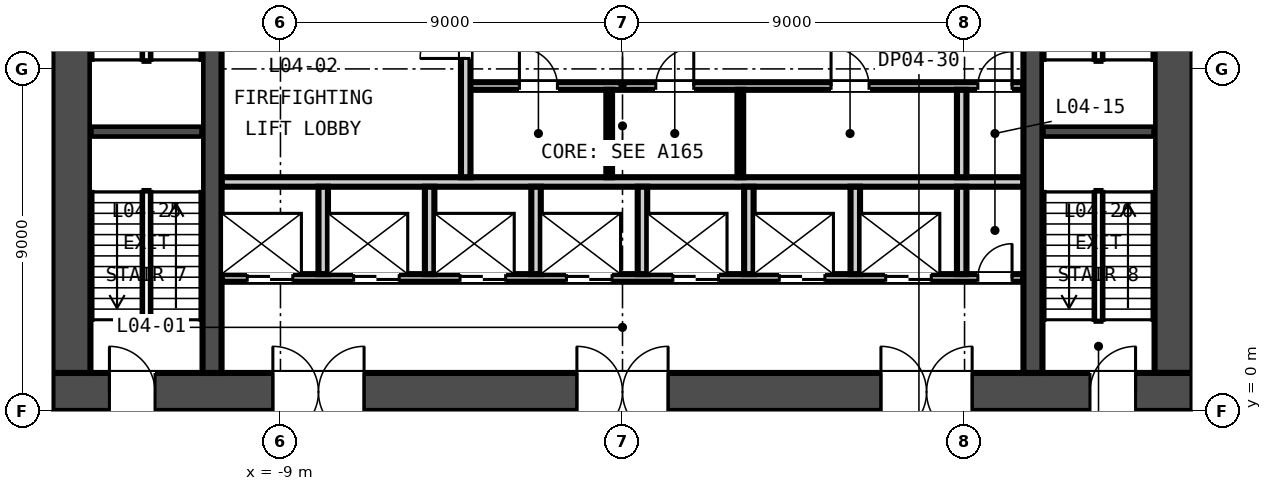
"""IFC4 building model, lengths in metres.
Left out: names, types, materials, properties, quantities, classifications, styles, units other than length and angle.
Written with IfcOpenShell. Run it as: python <this file> out.ifc"""

import sys

from ifc_helpers import new_model, si_unit, direction, frame, frame_2d, origin, place, context, subcontext, project, spatial, rectangle, extrude, element, fill, save


model = new_model("IFC4")
c1 = context("Model", 3, precision=1e-05, world=origin(), true_north=direction((0.0, 1.0)))
c2 = subcontext(c1, "Body", "Model", "MODEL_VIEW")
j1 = project(units=[si_unit("LENGTHUNIT", "METRE"), si_unit("PLANEANGLEUNIT", "RADIAN")], contexts=[c1])
p1 = place(None, origin())
s1 = spatial("IfcSite", under=j1, at=p1, CompositionType="ELEMENT")
p2 = place(p1, origin())
s2 = spatial("IfcBuilding", under=s1, at=p2, CompositionType="ELEMENT")
p3 = place(p2, frame((0.0, 0.0, 27.0)))
s3 = spatial("IfcBuildingStorey", under=s2, at=p3, CompositionType="ELEMENT", Elevation=27.0)
p4 = place(p3, frame((-15.0, 0.5, -0.3), z_axis=(0.0, 0.0, 1.0), x_axis=(1.0, 0.0, 0.0)))
e1 = element("IfcWall", 1, at=p4, inside=s3, PredefinedType="SOLIDWALL", context=c2, shape_type="SweptSolid", body=[
    extrude(rectangle(XDim=30.0, YDim=1.0, at=frame_2d((15.0, 0.0))), origin(), (0.0, 0.0, 1.0), 4.5),
])
p5 = place(p4, frame((5.8, 0.0, 0.3)))
e2 = element("IfcOpeningElement", 2, at=p5, cuts=e1, PredefinedType="OPENING", context=c2, shape_type="SweptSolid", body=[
    extrude(rectangle(XDim=2.4, YDim=2.4, at=frame_2d((1.2, 1.2))), frame((0.0, 0.51, 0.0), z_axis=(0.0, -1.0, 0.0), x_axis=(1.0, 0.0, 0.0)), (0.0, 0.0, 1.0), 1.02),
])
p6 = place(p4, frame((13.8, 0.0, 0.3)))
e3 = element("IfcOpeningElement", 3, at=p6, cuts=e1, PredefinedType="OPENING", context=c2, shape_type="SweptSolid", body=[
    extrude(rectangle(XDim=2.4, YDim=2.4, at=frame_2d((1.2, 1.2))), frame((0.0, 0.51, 0.0), z_axis=(0.0, -1.0, 0.0), x_axis=(1.0, 0.0, 0.0)), (0.0, 0.0, 1.0), 1.02),
])
p7 = place(p4, frame((21.8, 0.0, 0.3)))
e4 = element("IfcOpeningElement", 4, at=p7, cuts=e1, PredefinedType="OPENING", context=c2, shape_type="SweptSolid", body=[
    extrude(rectangle(XDim=2.4, YDim=2.4, at=frame_2d((1.2, 1.2))), frame((0.0, 0.51, 0.0), z_axis=(0.0, -1.0, 0.0), x_axis=(1.0, 0.0, 0.0)), (0.0, 0.0, 1.0), 1.02),
])
p8 = place(p4, frame((1.5, 0.0, 0.3)))
e5 = element("IfcOpeningElement", 5, at=p8, cuts=e1, PredefinedType="OPENING", context=c2, shape_type="SweptSolid", body=[
    extrude(rectangle(XDim=1.2, YDim=2.1, at=frame_2d((0.6, 1.05))), frame((0.0, 0.51, 0.0), z_axis=(0.0, -1.0, 0.0), x_axis=(1.0, 0.0, 0.0)), (0.0, 0.0, 1.0), 1.02),
])
p9 = place(p4, frame((27.3, 0.0, 0.3)))
e6 = element("IfcOpeningElement", 6, at=p9, cuts=e1, PredefinedType="OPENING", context=c2, shape_type="SweptSolid", body=[
    extrude(rectangle(XDim=1.2, YDim=2.1, at=frame_2d((0.6, 1.05))), frame((0.0, 0.51, 0.0), z_axis=(0.0, -1.0, 0.0), x_axis=(1.0, 0.0, 0.0)), (0.0, 0.0, 1.0), 1.02),
])
for number, where, z_axis, x_axis in (
    (7, (-14.5, 1.0, -0.3), (0.0, 0.0, 1.0), (0.0, 1.0, 0.0)),
    (8, (14.5, 1.0, -0.3), (0.0, 0.0, 1.0), (0.0, 1.0, 0.0)),
):
    element("IfcWall", number, at=place(p3, frame(where, z_axis=z_axis, x_axis=x_axis)), inside=s3, PredefinedType="SOLIDWALL", context=c2, shape_type="SweptSolid", body=[
        extrude(rectangle(XDim=13.0, YDim=1.0, at=frame_2d((6.5, 0.0))), origin(), (0.0, 0.0, 1.0), 4.5),
    ])
for number, where, z_axis, x_axis in (
    (9, (-10.8, 1.0, -0.3), (0.0, 0.0, 1.0), (0.0, 1.0, 0.0)),
    (10, (10.8, 1.0, -0.3), (0.0, 0.0, 1.0), (0.0, 1.0, 0.0)),
):
    element("IfcWall", number, at=place(p3, frame(where, z_axis=z_axis, x_axis=x_axis)), inside=s3, PredefinedType="SOLIDWALL", context=c2, shape_type="SweptSolid", body=[
        extrude(rectangle(XDim=13.0, YDim=0.5, at=frame_2d((6.5, 0.0))), origin(), (0.0, 0.0, 1.0), 4.5),
    ])
p10 = place(p3, frame((-10.55, 3.5, 0.0), z_axis=(0.0, 0.0, 1.0), x_axis=(1.0, 0.0, 0.0)))
e11 = element("IfcWall", 11, at=p10, inside=s3, PredefinedType="PARTITIONING", context=c2, shape_type="SweptSolid", body=[
    extrude(rectangle(XDim=21.1, YDim=0.2, at=frame_2d((10.55, 0.0))), origin(), (0.0, 0.0, 1.0), 4.2),
])
p11 = place(p10, frame((0.675, 0.0, 0.0)))
e12 = element("IfcOpeningElement", 12, at=p11, cuts=e11, PredefinedType="OPENING", context=c2, shape_type="SweptSolid", body=[
    extrude(rectangle(XDim=1.2, YDim=2.1, at=frame_2d((0.6, 1.05))), frame((0.0, 0.11, 0.0), z_axis=(0.0, -1.0, 0.0), x_axis=(1.0, 0.0, 0.0)), (0.0, 0.0, 1.0), 0.22),
])
p12 = place(p10, frame((3.475, 0.0, 0.0)))
e13 = element("IfcOpeningElement", 13, at=p12, cuts=e11, PredefinedType="OPENING", context=c2, shape_type="SweptSolid", body=[
    extrude(rectangle(XDim=1.2, YDim=2.1, at=frame_2d((0.6, 1.05))), frame((0.0, 0.11, 0.0), z_axis=(0.0, -1.0, 0.0), x_axis=(1.0, 0.0, 0.0)), (0.0, 0.0, 1.0), 0.22),
])
p13 = place(p10, frame((6.275, 0.0, 0.0)))
e14 = element("IfcOpeningElement", 14, at=p13, cuts=e11, PredefinedType="OPENING", context=c2, shape_type="SweptSolid", body=[
    extrude(rectangle(XDim=1.2, YDim=2.1, at=frame_2d((0.6, 1.05))), frame((0.0, 0.11, 0.0), z_axis=(0.0, -1.0, 0.0), x_axis=(1.0, 0.0, 0.0)), (0.0, 0.0, 1.0), 0.22),
])
p14 = place(p10, frame((9.075, 0.0, 0.0)))
e15 = element("IfcOpeningElement", 15, at=p14, cuts=e11, PredefinedType="OPENING", context=c2, shape_type="SweptSolid", body=[
    extrude(rectangle(XDim=1.2, YDim=2.1, at=frame_2d((0.6, 1.05))), frame((0.0, 0.11, 0.0), z_axis=(0.0, -1.0, 0.0), x_axis=(1.0, 0.0, 0.0)), (0.0, 0.0, 1.0), 0.22),
])
p15 = place(p10, frame((11.875, 0.0, 0.0)))
e16 = element("IfcOpeningElement", 16, at=p15, cuts=e11, PredefinedType="OPENING", context=c2, shape_type="SweptSolid", body=[
    extrude(rectangle(XDim=1.2, YDim=2.1, at=frame_2d((0.6, 1.05))), frame((0.0, 0.11, 0.0), z_axis=(0.0, -1.0, 0.0), x_axis=(1.0, 0.0, 0.0)), (0.0, 0.0, 1.0), 0.22),
])
p16 = place(p10, frame((14.675, 0.0, 0.0)))
e17 = element("IfcOpeningElement", 17, at=p16, cuts=e11, PredefinedType="OPENING", context=c2, shape_type="SweptSolid", body=[
    extrude(rectangle(XDim=1.2, YDim=2.1, at=frame_2d((0.6, 1.05))), frame((0.0, 0.11, 0.0), z_axis=(0.0, -1.0, 0.0), x_axis=(1.0, 0.0, 0.0)), (0.0, 0.0, 1.0), 0.22),
])
p17 = place(p10, frame((17.475, 0.0, 0.0)))
e18 = element("IfcOpeningElement", 18, at=p17, cuts=e11, PredefinedType="OPENING", context=c2, shape_type="SweptSolid", body=[
    extrude(rectangle(XDim=1.2, YDim=2.1, at=frame_2d((0.6, 1.05))), frame((0.0, 0.11, 0.0), z_axis=(0.0, -1.0, 0.0), x_axis=(1.0, 0.0, 0.0)), (0.0, 0.0, 1.0), 0.22),
])
p18 = place(p10, frame((19.9, 0.0, 0.0)))
e19 = element("IfcOpeningElement", 19, at=p18, cuts=e11, PredefinedType="OPENING", context=c2, shape_type="SweptSolid", body=[
    extrude(rectangle(XDim=0.9, YDim=2.1, at=frame_2d((0.45, 1.05))), frame((0.0, 0.11, 0.0), z_axis=(0.0, -1.0, 0.0), x_axis=(1.0, 0.0, 0.0)), (0.0, 0.0, 1.0), 0.22),
])
p19 = place(p3, frame((-10.55, 6.025, 0.0), z_axis=(0.0, 0.0, 1.0), x_axis=(1.0, 0.0, 0.0)))
e20 = element("IfcWall", 20, at=p19, inside=s3, PredefinedType="PARTITIONING", context=c2, shape_type="SweptSolid", body=[
    extrude(rectangle(XDim=21.1, YDim=0.25, at=frame_2d((10.55, 0.0))), origin(), (0.0, 0.0, 1.0), 4.2),
])
p20 = place(p3, frame((-4.125, 8.55, 0.0), z_axis=(0.0, 0.0, 1.0), x_axis=(1.0, 0.0, 0.0)))
e21 = element("IfcWall", 21, at=p20, inside=s3, PredefinedType="PARTITIONING", context=c2, shape_type="SweptSolid", body=[
    extrude(rectangle(XDim=14.675, YDim=0.2, at=frame_2d((7.337, 0.0))), origin(), (0.0, 0.0, 1.0), 4.2),
])
p21 = place(p20, frame((1.413, 0.0, 0.0)))
e22 = element("IfcOpeningElement", 22, at=p21, cuts=e21, PredefinedType="OPENING", context=c2, shape_type="SweptSolid", body=[
    extrude(rectangle(XDim=1.0, YDim=2.1, at=frame_2d((0.5, 1.05))), frame((0.0, 0.11, 0.0), z_axis=(0.0, -1.0, 0.0), x_axis=(1.0, 0.0, 0.0)), (0.0, 0.0, 1.0), 0.22),
])
p22 = place(p20, frame((5.0, 0.0, 0.0)))
e23 = element("IfcOpeningElement", 23, at=p22, cuts=e21, PredefinedType="OPENING", context=c2, shape_type="SweptSolid", body=[
    extrude(rectangle(XDim=1.0, YDim=2.1, at=frame_2d((0.5, 1.05))), frame((0.0, 0.11, 0.0), z_axis=(0.0, -1.0, 0.0), x_axis=(1.0, 0.0, 0.0)), (0.0, 0.0, 1.0), 0.22),
])
p23 = place(p20, frame((9.613, 0.0, 0.0)))
e24 = element("IfcOpeningElement", 24, at=p23, cuts=e21, PredefinedType="OPENING", context=c2, shape_type="SweptSolid", body=[
    extrude(rectangle(XDim=1.0, YDim=2.1, at=frame_2d((0.5, 1.05))), frame((0.0, 0.11, 0.0), z_axis=(0.0, -1.0, 0.0), x_axis=(1.0, 0.0, 0.0)), (0.0, 0.0, 1.0), 0.22),
])
p24 = place(p20, frame((13.475, 0.0, 0.0)))
e25 = element("IfcOpeningElement", 25, at=p24, cuts=e21, PredefinedType="OPENING", context=c2, shape_type="SweptSolid", body=[
    extrude(rectangle(XDim=0.9, YDim=2.1, at=frame_2d((0.45, 1.05))), frame((0.0, 0.11, 0.0), z_axis=(0.0, -1.0, 0.0), x_axis=(1.0, 0.0, 0.0)), (0.0, 0.0, 1.0), 0.22),
])
p25 = place(p3, frame((-4.125, 6.15, 0.0), z_axis=(0.0, 0.0, 1.0), x_axis=(0.0, 1.0, 0.0)))
e26 = element("IfcWall", 26, at=p25, inside=s3, PredefinedType="PARTITIONING", context=c2, shape_type="SweptSolid", body=[
    extrude(rectangle(XDim=4.95, YDim=0.25, at=frame_2d((2.475, 0.0))), origin(), (0.0, 0.0, 1.0), 4.2),
])
p26 = place(p25, frame((3.125, 0.0, 0.0)))
e27 = element("IfcOpeningElement", 27, at=p26, cuts=e26, PredefinedType="OPENING", context=c2, shape_type="SweptSolid", body=[
    extrude(rectangle(XDim=1.2, YDim=2.1, at=frame_2d((0.6, 1.05))), frame((0.0, 0.135, 0.0), z_axis=(0.0, -1.0, 0.0), x_axis=(1.0, 0.0, 0.0)), (0.0, 0.0, 1.0), 0.27),
])
for number, where, z_axis, x_axis in (
    (28, (-7.875, 3.6, 0.0), (0.0, 0.0, 1.0), (0.0, 1.0, 0.0)),
    (29, (-5.075, 3.6, 0.0), (0.0, 0.0, 1.0), (0.0, 1.0, 0.0)),
    (30, (-2.275, 3.6, 0.0), (0.0, 0.0, 1.0), (0.0, 1.0, 0.0)),
    (31, (0.525, 3.6, 0.0), (0.0, 0.0, 1.0), (0.0, 1.0, 0.0)),
    (32, (3.325, 3.6, 0.0), (0.0, 0.0, 1.0), (0.0, 1.0, 0.0)),
    (33, (6.125, 3.6, 0.0), (0.0, 0.0, 1.0), (0.0, 1.0, 0.0)),
    (34, (8.925, 3.6, 0.0), (0.0, 0.0, 1.0), (0.0, 1.0, 0.0)),
):
    element("IfcWall", number, at=place(p3, frame(where, z_axis=z_axis, x_axis=x_axis)), inside=s3, PredefinedType="PARTITIONING", context=c2, shape_type="SweptSolid", body=[
        extrude(rectangle(XDim=2.3, YDim=0.25, at=frame_2d((1.15, 0.0))), origin(), (0.0, 0.0, 1.0), 4.2),
    ])
for number, where, z_axis, x_axis in (
    (35, (-0.35, 6.15, 0.0), (0.0, 0.0, 1.0), (0.0, 1.0, 0.0)),
    (36, (3.1, 6.15, 0.0), (0.0, 0.0, 1.0), (0.0, 1.0, 0.0)),
):
    element("IfcWall", number, at=place(p3, frame(where, z_axis=z_axis, x_axis=x_axis)), inside=s3, PredefinedType="PARTITIONING", context=c2, shape_type="SweptSolid", body=[
        extrude(rectangle(XDim=2.3, YDim=0.15, at=frame_2d((1.15, 0.0))), origin(), (0.0, 0.0, 1.0), 4.2),
    ])
p27 = place(p3, frame((8.925, 6.15, 0.0), z_axis=(0.0, 0.0, 1.0), x_axis=(0.0, 1.0, 0.0)))
e37 = element("IfcWall", 37, at=p27, inside=s3, PredefinedType="PARTITIONING", context=c2, shape_type="SweptSolid", body=[
    extrude(rectangle(XDim=2.3, YDim=0.25, at=frame_2d((1.15, 0.0))), origin(), (0.0, 0.0, 1.0), 4.2),
])
for number, where, z_axis, x_axis in (
    (38, (-14.0, 7.35, -0.3), (0.0, 0.0, 1.0), (1.0, 0.0, 0.0)),
    (39, (11.05, 7.35, -0.3), (0.0, 0.0, 1.0), (1.0, 0.0, 0.0)),
):
    element("IfcWall", number, at=place(p3, frame(where, z_axis=z_axis, x_axis=x_axis)), inside=s3, PredefinedType="SOLIDWALL", context=c2, shape_type="SweptSolid", body=[
        extrude(rectangle(XDim=2.95, YDim=0.3, at=frame_2d((1.475, 0.0))), origin(), (0.0, 0.0, 1.0), 4.5),
    ])
p28 = place(p26, origin())
e40 = element("IfcDoor", 40, at=p28, inside=s3, OperationType="SINGLE_SWING_LEFT", PredefinedType="DOOR", context=c2, shape_type="SweptSolid", body=[
    extrude(rectangle(XDim=1.2, YDim=2.1, at=frame_2d((0.6, 1.05))), frame((0.0, 0.025, 0.0), z_axis=(0.0, -1.0, 0.0), x_axis=(1.0, 0.0, 0.0)), (0.0, 0.0, 1.0), 0.05),
])
fill(e27, e40)
p29 = place(p11, origin())
e41 = element("IfcDoor", 41, at=p29, inside=s3, OperationType="DOUBLE_DOOR_SLIDING", PredefinedType="DOOR", context=c2, shape_type="SweptSolid", body=[
    extrude(rectangle(XDim=1.2, YDim=2.1, at=frame_2d((0.6, 1.05))), frame((0.0, 0.025, 0.0), z_axis=(0.0, -1.0, 0.0), x_axis=(1.0, 0.0, 0.0)), (0.0, 0.0, 1.0), 0.05),
])
fill(e12, e41)
p30 = place(p12, origin())
e42 = element("IfcDoor", 42, at=p30, inside=s3, OperationType="DOUBLE_DOOR_SLIDING", PredefinedType="DOOR", context=c2, shape_type="SweptSolid", body=[
    extrude(rectangle(XDim=1.2, YDim=2.1, at=frame_2d((0.6, 1.05))), frame((0.0, 0.025, 0.0), z_axis=(0.0, -1.0, 0.0), x_axis=(1.0, 0.0, 0.0)), (0.0, 0.0, 1.0), 0.05),
])
fill(e13, e42)
p31 = place(p13, origin())
e43 = element("IfcDoor", 43, at=p31, inside=s3, OperationType="DOUBLE_DOOR_SLIDING", PredefinedType="DOOR", context=c2, shape_type="SweptSolid", body=[
    extrude(rectangle(XDim=1.2, YDim=2.1, at=frame_2d((0.6, 1.05))), frame((0.0, 0.025, 0.0), z_axis=(0.0, -1.0, 0.0), x_axis=(1.0, 0.0, 0.0)), (0.0, 0.0, 1.0), 0.05),
])
fill(e14, e43)
p32 = place(p14, origin())
e44 = element("IfcDoor", 44, at=p32, inside=s3, OperationType="DOUBLE_DOOR_SLIDING", PredefinedType="DOOR", context=c2, shape_type="SweptSolid", body=[
    extrude(rectangle(XDim=1.2, YDim=2.1, at=frame_2d((0.6, 1.05))), frame((0.0, 0.025, 0.0), z_axis=(0.0, -1.0, 0.0), x_axis=(1.0, 0.0, 0.0)), (0.0, 0.0, 1.0), 0.05),
])
fill(e15, e44)
p33 = place(p15, origin())
e45 = element("IfcDoor", 45, at=p33, inside=s3, OperationType="DOUBLE_DOOR_SLIDING", PredefinedType="DOOR", context=c2, shape_type="SweptSolid", body=[
    extrude(rectangle(XDim=1.2, YDim=2.1, at=frame_2d((0.6, 1.05))), frame((0.0, 0.025, 0.0), z_axis=(0.0, -1.0, 0.0), x_axis=(1.0, 0.0, 0.0)), (0.0, 0.0, 1.0), 0.05),
])
fill(e16, e45)
p34 = place(p16, origin())
e46 = element("IfcDoor", 46, at=p34, inside=s3, OperationType="DOUBLE_DOOR_SLIDING", PredefinedType="DOOR", context=c2, shape_type="SweptSolid", body=[
    extrude(rectangle(XDim=1.2, YDim=2.1, at=frame_2d((0.6, 1.05))), frame((0.0, 0.025, 0.0), z_axis=(0.0, -1.0, 0.0), x_axis=(1.0, 0.0, 0.0)), (0.0, 0.0, 1.0), 0.05),
])
fill(e17, e46)
p35 = place(p17, origin())
e47 = element("IfcDoor", 47, at=p35, inside=s3, OperationType="DOUBLE_DOOR_SLIDING", PredefinedType="DOOR", context=c2, shape_type="SweptSolid", body=[
    extrude(rectangle(XDim=1.2, YDim=2.1, at=frame_2d((0.6, 1.05))), frame((0.0, 0.025, 0.0), z_axis=(0.0, -1.0, 0.0), x_axis=(1.0, 0.0, 0.0)), (0.0, 0.0, 1.0), 0.05),
])
fill(e18, e47)
p36 = place(p18, origin())
e48 = element("IfcDoor", 48, at=p36, inside=s3, OperationType="SINGLE_SWING_RIGHT", PredefinedType="DOOR", context=c2, shape_type="SweptSolid", body=[
    extrude(rectangle(XDim=0.9, YDim=2.1, at=frame_2d((0.45, 1.05))), frame((0.0, 0.025, 0.0), z_axis=(0.0, -1.0, 0.0), x_axis=(1.0, 0.0, 0.0)), (0.0, 0.0, 1.0), 0.05),
])
fill(e19, e48)
p37 = place(p21, origin())
e49 = element("IfcDoor", 49, at=p37, inside=s3, OperationType="SINGLE_SWING_LEFT", PredefinedType="DOOR", context=c2, shape_type="SweptSolid", body=[
    extrude(rectangle(XDim=1.0, YDim=2.1, at=frame_2d((0.5, 1.05))), frame((0.0, 0.025, 0.0), z_axis=(0.0, -1.0, 0.0), x_axis=(1.0, 0.0, 0.0)), (0.0, 0.0, 1.0), 0.05),
])
fill(e22, e49)
p38 = place(p22, origin())
e50 = element("IfcDoor", 50, at=p38, inside=s3, OperationType="SINGLE_SWING_RIGHT", PredefinedType="DOOR", context=c2, shape_type="SweptSolid", body=[
    extrude(rectangle(XDim=1.0, YDim=2.1, at=frame_2d((0.5, 1.05))), frame((0.0, 0.025, 0.0), z_axis=(0.0, -1.0, 0.0), x_axis=(1.0, 0.0, 0.0)), (0.0, 0.0, 1.0), 0.05),
])
fill(e23, e50)
p39 = place(p23, origin())
e51 = element("IfcDoor", 51, at=p39, inside=s3, OperationType="SINGLE_SWING_LEFT", PredefinedType="DOOR", context=c2, shape_type="SweptSolid", body=[
    extrude(rectangle(XDim=1.0, YDim=2.1, at=frame_2d((0.5, 1.05))), frame((0.0, 0.025, 0.0), z_axis=(0.0, -1.0, 0.0), x_axis=(1.0, 0.0, 0.0)), (0.0, 0.0, 1.0), 0.05),
])
fill(e24, e51)
p40 = place(p24, origin())
e52 = element("IfcDoor", 52, at=p40, inside=s3, OperationType="SINGLE_SWING_RIGHT", PredefinedType="DOOR", context=c2, shape_type="SweptSolid", body=[
    extrude(rectangle(XDim=0.9, YDim=2.1, at=frame_2d((0.45, 1.05))), frame((0.0, 0.025, 0.0), z_axis=(0.0, -1.0, 0.0), x_axis=(1.0, 0.0, 0.0)), (0.0, 0.0, 1.0), 0.05),
])
fill(e25, e52)
p41 = place(p5, origin())
e53 = element("IfcDoor", 53, at=p41, inside=s3, OperationType="DOUBLE_DOOR_DOUBLE_SWING", PredefinedType="DOOR", context=c2, shape_type="SweptSolid", body=[
    extrude(rectangle(XDim=2.4, YDim=2.4, at=frame_2d((1.2, 1.2))), frame((0.0, 0.025, 0.0), z_axis=(0.0, -1.0, 0.0), x_axis=(1.0, 0.0, 0.0)), (0.0, 0.0, 1.0), 0.05),
])
fill(e2, e53)
p42 = place(p6, origin())
e54 = element("IfcDoor", 54, at=p42, inside=s3, OperationType="DOUBLE_DOOR_DOUBLE_SWING", PredefinedType="DOOR", context=c2, shape_type="SweptSolid", body=[
    extrude(rectangle(XDim=2.4, YDim=2.4, at=frame_2d((1.2, 1.2))), frame((0.0, 0.025, 0.0), z_axis=(0.0, -1.0, 0.0), x_axis=(1.0, 0.0, 0.0)), (0.0, 0.0, 1.0), 0.05),
])
fill(e3, e54)
p43 = place(p7, origin())
e55 = element("IfcDoor", 55, at=p43, inside=s3, OperationType="DOUBLE_DOOR_DOUBLE_SWING", PredefinedType="DOOR", context=c2, shape_type="SweptSolid", body=[
    extrude(rectangle(XDim=2.4, YDim=2.4, at=frame_2d((1.2, 1.2))), frame((0.0, 0.025, 0.0), z_axis=(0.0, -1.0, 0.0), x_axis=(1.0, 0.0, 0.0)), (0.0, 0.0, 1.0), 0.05),
])
fill(e4, e55)
p44 = place(p8, origin())
e56 = element("IfcDoor", 56, at=p44, inside=s3, OperationType="SINGLE_SWING_LEFT", PredefinedType="DOOR", context=c2, shape_type="SweptSolid", body=[
    extrude(rectangle(XDim=1.2, YDim=2.1, at=frame_2d((0.6, 1.05))), frame((0.0, 0.025, 0.0), z_axis=(0.0, -1.0, 0.0), x_axis=(1.0, 0.0, 0.0)), (0.0, 0.0, 1.0), 0.05),
])
fill(e5, e56)
p45 = place(p9, origin())
e57 = element("IfcDoor", 57, at=p45, inside=s3, OperationType="SINGLE_SWING_RIGHT", PredefinedType="DOOR", context=c2, shape_type="SweptSolid", body=[
    extrude(rectangle(XDim=1.2, YDim=2.1, at=frame_2d((0.6, 1.05))), frame((0.0, 0.025, 0.0), z_axis=(0.0, -1.0, 0.0), x_axis=(1.0, 0.0, 0.0)), (0.0, 0.0, 1.0), 0.05),
])
fill(e6, e57)
save(model, sys.argv[1])
